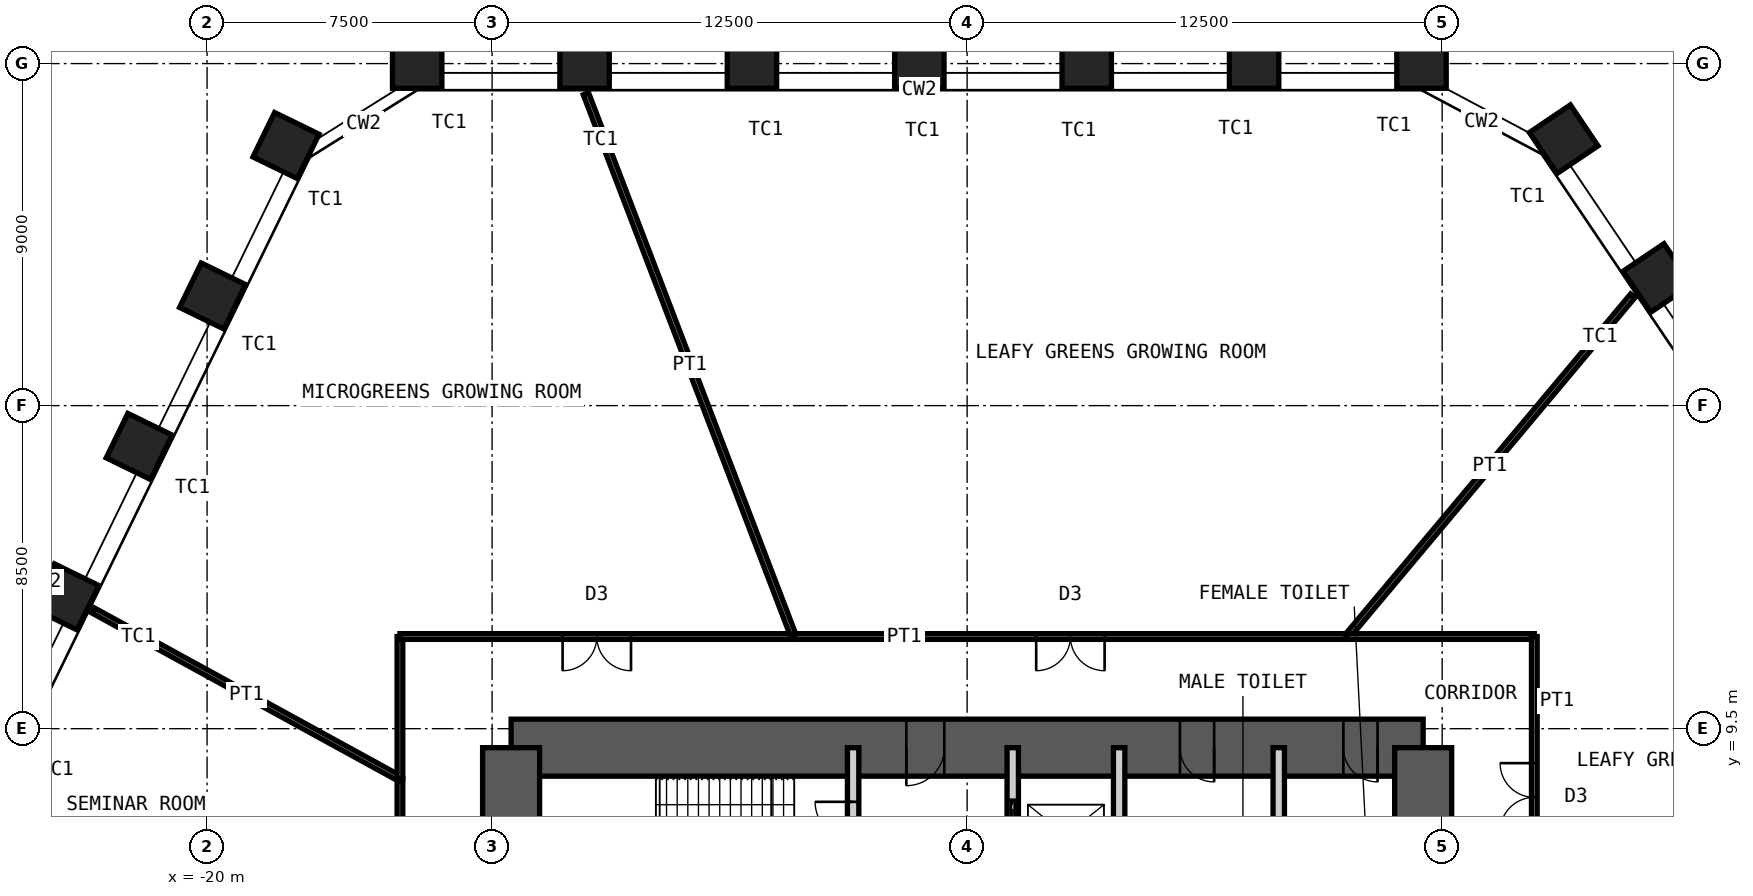
"""IFC4 building model, lengths in metres.
Left out: names, types, materials, properties, quantities, classifications, styles, units other than length and angle.
Written with IfcOpenShell. Run it as: python <this file> out.ifc"""

import sys

from ifc_helpers import new_model, si_unit, direction, frame, frame_2d, origin, origin_2d, place, context, subcontext, project, spatial, rectangle, hollow_rectangle, extrude, element, fill, save


model = new_model("IFC4")
c1 = context("Model", 3, precision=1e-05, world=origin(), true_north=direction((0.0, 1.0)))
c2 = subcontext(c1, "Body", "Model", "MODEL_VIEW")
j1 = project(units=[si_unit("LENGTHUNIT", "METRE"), si_unit("PLANEANGLEUNIT", "RADIAN")], contexts=[c1])
p1 = place(None, origin())
s1 = spatial("IfcSite", under=j1, at=p1, CompositionType="ELEMENT")
p2 = place(p1, origin())
s2 = spatial("IfcBuilding", under=s1, at=p2, CompositionType="ELEMENT")
p3 = place(p2, frame((0.0, 0.0, 22.0)))
s3 = spatial("IfcBuildingStorey", under=s2, at=p3, CompositionType="ELEMENT", Elevation=22.0)
for number, where, z_axis, x_axis in (
    (1, (-14.471, 27.0, 0.0), (0.0, 0.0, 1.0), (-1.0, 0.0, 0.0)),
    (2, (-10.067, 27.0, 0.0), (0.0, 0.0, 1.0), (-1.0, 0.0, 0.0)),
    (3, (-5.662, 27.0, 0.0), (0.0, 0.0, 1.0), (-1.0, 0.0, 0.0)),
    (4, (-1.258, 27.0, 0.0), (0.0, 0.0, 1.0), (-1.0, 0.0, 0.0)),
    (5, (3.147, 27.0, 0.0), (0.0, 0.0, 1.0), (-1.0, 0.0, 0.0)),
    (6, (7.552, 27.0, 0.0), (0.0, 0.0, 1.0), (-1.0, 0.0, 0.0)),
    (7, (11.956, 27.0, 0.0), (0.0, 0.0, 1.0), (-1.0, 0.0, 0.0)),
    (8, (15.698, 25.01, 0.0), (0.0, 0.0, 1.0), (-0.559, 0.829, 0.0)),
    (9, (18.161, 21.359, 0.0), (0.0, 0.0, 1.0), (-0.559, 0.829, 0.0)),
    (10, (-23.716, 12.966, 0.0), (0.0, 0.0, 1.0), (-0.438, -0.899, 0.0)),
    (11, (-21.785, 16.925, 0.0), (0.0, 0.0, 1.0), (-0.438, -0.899, 0.0)),
    (12, (-19.854, 20.884, 0.0), (0.0, 0.0, 1.0), (-0.438, -0.899, 0.0)),
    (13, (-17.924, 24.843, 0.0), (0.0, 0.0, 1.0), (-0.438, -0.899, 0.0)),
):
    element("IfcColumn", number, at=place(p3, frame(where, z_axis=z_axis, x_axis=x_axis)), inside=s3, PredefinedType="COLUMN", context=c2, shape_type="SweptSolid", body=[
        extrude(hollow_rectangle(XDim=1.3, YDim=1.3, WallThickness=0.1, at=origin_2d()), origin(), (0.0, 0.0, 1.0), 5.0),
    ])
p4 = place(p3, frame((-12.0, 9.0, 0.0), z_axis=(0.0, 0.0, 1.0), x_axis=(1.0, 0.0, 0.0)))
e14 = element("IfcWall", 14, at=p4, inside=s3, PredefinedType="SHEAR", context=c2, shape_type="SweptSolid", body=[
    extrude(rectangle(XDim=24.0, YDim=1.5, at=frame_2d((12.0, 0.0))), origin(), (0.0, 0.0, 1.0), 5.0),
])
p5 = place(p4, frame((10.4, 0.0, 0.0)))
e15 = element("IfcOpeningElement", 15, at=p5, cuts=e14, PredefinedType="OPENING", context=c2, shape_type="SweptSolid", body=[
    extrude(rectangle(XDim=1.0, YDim=2.1, at=frame_2d((0.5, 1.05))), frame((0.0, 0.76, 0.0), z_axis=(0.0, -1.0, 0.0), x_axis=(1.0, 0.0, 0.0)), (0.0, 0.0, 1.0), 1.52),
])
p6 = place(p4, frame((17.6, 0.0, 0.0)))
e16 = element("IfcOpeningElement", 16, at=p6, cuts=e14, PredefinedType="OPENING", context=c2, shape_type="SweptSolid", body=[
    extrude(rectangle(XDim=0.9, YDim=2.1, at=frame_2d((0.45, 1.05))), frame((0.0, 0.76, 0.0), z_axis=(0.0, -1.0, 0.0), x_axis=(1.0, 0.0, 0.0)), (0.0, 0.0, 1.0), 1.52),
])
p7 = place(p4, frame((21.9, 0.0, 0.0)))
e17 = element("IfcOpeningElement", 17, at=p7, cuts=e14, PredefinedType="OPENING", context=c2, shape_type="SweptSolid", body=[
    extrude(rectangle(XDim=0.9, YDim=2.1, at=frame_2d((0.45, 1.05))), frame((0.0, 0.76, 0.0), z_axis=(0.0, -1.0, 0.0), x_axis=(1.0, 0.0, 0.0)), (0.0, 0.0, 1.0), 1.52),
])
p8 = place(p3, frame((12.0, -9.0, 0.0), z_axis=(0.0, 0.0, 1.0), x_axis=(0.0, 1.0, 0.0)))
e18 = element("IfcWall", 18, at=p8, inside=s3, PredefinedType="SHEAR", context=c2, shape_type="SweptSolid", body=[
    extrude(rectangle(XDim=18.0, YDim=1.5, at=frame_2d((9.0, 0.0))), origin(), (0.0, 0.0, 1.0), 5.0),
])
p9 = place(p8, frame((8.1, 0.0, 0.0)))
e19 = element("IfcOpeningElement", 19, at=p9, cuts=e18, PredefinedType="OPENING", context=c2, shape_type="SweptSolid", body=[
    extrude(rectangle(XDim=1.8, YDim=2.1, at=frame_2d((0.9, 1.05))), frame((0.0, 0.76, 0.0), z_axis=(0.0, -1.0, 0.0), x_axis=(1.0, 0.0, 0.0)), (0.0, 0.0, 1.0), 1.52),
])
p10 = place(p3, frame((-12.0, -9.0, 0.0), z_axis=(0.0, 0.0, 1.0), x_axis=(0.0, 1.0, 0.0)))
e20 = element("IfcWall", 20, at=p10, inside=s3, PredefinedType="SHEAR", context=c2, shape_type="SweptSolid", body=[
    extrude(rectangle(XDim=18.0, YDim=1.5, at=frame_2d((9.0, 0.0))), origin(), (0.0, 0.0, 1.0), 5.0),
])
p11 = place(p10, frame((8.1, 0.0, 0.0)))
e21 = element("IfcOpeningElement", 21, at=p11, cuts=e20, PredefinedType="OPENING", context=c2, shape_type="SweptSolid", body=[
    extrude(rectangle(XDim=1.8, YDim=2.1, at=frame_2d((0.9, 1.05))), frame((0.0, 0.76, 0.0), z_axis=(0.0, -1.0, 0.0), x_axis=(1.0, 0.0, 0.0)), (0.0, 0.0, 1.0), 1.52),
])
p12 = place(p3, frame((-3.0, 5.15, 0.0), z_axis=(0.0, 0.0, 1.0), x_axis=(0.0, 1.0, 0.0)))
e22 = element("IfcWall", 22, at=p12, inside=s3, PredefinedType="PARTITIONING", context=c2, shape_type="SweptSolid", body=[
    extrude(rectangle(XDim=3.85, YDim=0.3, at=frame_2d((1.925, 0.0))), origin(), (0.0, 0.0, 1.0), 4.78),
])
p13 = place(p12, frame((1.425, 0.0, 0.0)))
e23 = element("IfcOpeningElement", 23, at=p13, cuts=e22, PredefinedType="OPENING", context=c2, shape_type="SweptSolid", body=[
    extrude(rectangle(XDim=1.0, YDim=2.1, at=frame_2d((0.5, 1.05))), frame((0.0, 0.16, 0.0), z_axis=(0.0, -1.0, 0.0), x_axis=(1.0, 0.0, 0.0)), (0.0, 0.0, 1.0), 0.32),
])
p14 = place(p3, frame((1.2, 5.15, 0.0), z_axis=(0.0, 0.0, 1.0), x_axis=(0.0, 1.0, 0.0)))
e24 = element("IfcWall", 24, at=p14, inside=s3, PredefinedType="PARTITIONING", context=c2, shape_type="SweptSolid", body=[
    extrude(rectangle(XDim=3.85, YDim=0.3, at=frame_2d((1.925, 0.0))), origin(), (0.0, 0.0, 1.0), 4.78),
])
p15 = place(p14, frame((1.375, 0.0, 0.0)))
e25 = element("IfcOpeningElement", 25, at=p15, cuts=e24, PredefinedType="OPENING", context=c2, shape_type="SweptSolid", body=[
    extrude(rectangle(XDim=1.1, YDim=2.4, at=frame_2d((0.55, 1.2))), frame((0.0, 0.16, 0.0), z_axis=(0.0, -1.0, 0.0), x_axis=(1.0, 0.0, 0.0)), (0.0, 0.0, 1.0), 0.32),
])
for number, where, z_axis, x_axis in (
    (26, (4.0, 5.15, 0.0), (0.0, 0.0, 1.0), (0.0, 1.0, 0.0)),
    (27, (8.2, 5.15, 0.0), (0.0, 0.0, 1.0), (0.0, 1.0, 0.0)),
):
    element("IfcWall", number, at=place(p3, frame(where, z_axis=z_axis, x_axis=x_axis)), inside=s3, PredefinedType="PARTITIONING", context=c2, shape_type="SweptSolid", body=[
        extrude(rectangle(XDim=3.85, YDim=0.3, at=frame_2d((1.925, 0.0))), origin(), (0.0, 0.0, 1.0), 4.78),
    ])
p16 = place(p3, frame((-14.925, 2.626, 0.0), z_axis=(0.0, 0.0, 1.0), x_axis=(0.0, 1.0, 0.0)))
e28 = element("IfcWall", 28, at=p16, inside=s3, PredefinedType="PARTITIONING", context=c2, shape_type="SweptSolid", body=[
    extrude(rectangle(XDim=5.558, YDim=0.15, at=frame_2d((2.779, 0.0))), origin(), (0.0, 0.0, 1.0), 4.8),
])
p17 = place(p16, frame((2.279, 0.0, 0.0)))
e29 = element("IfcOpeningElement", 29, at=p17, cuts=e28, PredefinedType="OPENING", context=c2, shape_type="SweptSolid", body=[
    extrude(rectangle(XDim=1.0, YDim=2.4, at=frame_2d((0.5, 1.2))), frame((0.0, 0.085, 0.0), z_axis=(0.0, -1.0, 0.0), x_axis=(1.0, 0.0, 0.0)), (0.0, 0.0, 1.0), 0.17),
])
p18 = place(p3, frame((-22.999, 12.612, 0.0), z_axis=(0.0, 0.0, 1.0), x_axis=(0.876826470608, -0.480806967963, 0.0)))
e30 = element("IfcWall", 30, at=p18, inside=s3, PredefinedType="PARTITIONING", context=c2, shape_type="SweptSolid", body=[
    extrude(rectangle(XDim=9.208, YDim=0.15, at=frame_2d((4.604, 0.0))), origin(), (0.0, 0.0, 1.0), 3.7),
])
p19 = place(p3, frame((-14.925, 8.184, 0.0), z_axis=(0.0, 0.0, 1.0), x_axis=(0.0, 1.0, 0.0)))
e31 = element("IfcWall", 31, at=p19, inside=s3, PredefinedType="PARTITIONING", context=c2, shape_type="SweptSolid", body=[
    extrude(rectangle(XDim=3.741, YDim=0.15, at=frame_2d((1.871, 0.0))), origin(), (0.0, 0.0, 1.0), 4.8),
])
p20 = place(p3, frame((-14.925, 11.925, 0.0), z_axis=(0.0, 0.0, 1.0), x_axis=(1.0, 0.0, 0.0)))
e32 = element("IfcWall", 32, at=p20, inside=s3, PredefinedType="PARTITIONING", context=c2, shape_type="SweptSolid", body=[
    extrude(rectangle(XDim=10.361, YDim=0.15, at=frame_2d((5.18, 0.0))), origin(), (0.0, 0.0, 1.0), 4.8),
])
p21 = place(p20, frame((4.28, 0.0, 0.0)))
e33 = element("IfcOpeningElement", 33, at=p21, cuts=e32, PredefinedType="OPENING", context=c2, shape_type="SweptSolid", body=[
    extrude(rectangle(XDim=1.8, YDim=2.4, at=frame_2d((0.9, 1.2))), frame((0.0, 0.085, 0.0), z_axis=(0.0, -1.0, 0.0), x_axis=(1.0, 0.0, 0.0)), (0.0, 0.0, 1.0), 0.17),
])
p22 = place(p3, frame((-10.031, 26.207, 0.0), z_axis=(0.0, 0.0, 1.0), x_axis=(0.357478701909, -0.933921290946, 0.0)))
e34 = element("IfcWall", 34, at=p22, inside=s3, PredefinedType="PARTITIONING", context=c2, shape_type="SweptSolid", body=[
    extrude(rectangle(XDim=15.292, YDim=0.15, at=frame_2d((7.646, 0.0))), origin(), (0.0, 0.0, 1.0), 3.7),
])
p23 = place(p3, frame((-4.564, 11.925, 0.0), z_axis=(0.0, 0.0, 1.0), x_axis=(1.0, 0.0, 0.0)))
e35 = element("IfcWall", 35, at=p23, inside=s3, PredefinedType="PARTITIONING", context=c2, shape_type="SweptSolid", body=[
    extrude(rectangle(XDim=14.563, YDim=0.15, at=frame_2d((7.282, 0.0))), origin(), (0.0, 0.0, 1.0), 4.8),
])
p24 = place(p23, frame((6.382, 0.0, 0.0)))
e36 = element("IfcOpeningElement", 36, at=p24, cuts=e35, PredefinedType="OPENING", context=c2, shape_type="SweptSolid", body=[
    extrude(rectangle(XDim=1.8, YDim=2.4, at=frame_2d((0.9, 1.2))), frame((0.0, 0.085, 0.0), z_axis=(0.0, -1.0, 0.0), x_axis=(1.0, 0.0, 0.0)), (0.0, 0.0, 1.0), 0.17),
])
p25 = place(p3, frame((17.517, 20.891, 0.0), z_axis=(0.0, 0.0, 1.0), x_axis=(-0.642515050703, -0.766273064658, 0.0)))
e37 = element("IfcWall", 37, at=p25, inside=s3, PredefinedType="PARTITIONING", context=c2, shape_type="SweptSolid", body=[
    extrude(rectangle(XDim=11.7, YDim=0.15, at=frame_2d((5.85, 0.0))), origin(), (0.0, 0.0, 1.0), 3.7),
])
p26 = place(p3, frame((9.999, 11.925, 0.0), z_axis=(0.0, 0.0, 1.0), x_axis=(1.0, 0.0, 0.0)))
e38 = element("IfcWall", 38, at=p26, inside=s3, PredefinedType="PARTITIONING", context=c2, shape_type="SweptSolid", body=[
    extrude(rectangle(XDim=4.926, YDim=0.15, at=frame_2d((2.463, 0.0))), origin(), (0.0, 0.0, 1.0), 4.8),
])
p27 = place(p3, frame((14.925, 11.925, 0.0), z_axis=(0.0, 0.0, 1.0), x_axis=(0.0, -1.0, 0.0)))
e39 = element("IfcWall", 39, at=p27, inside=s3, PredefinedType="PARTITIONING", context=c2, shape_type="SweptSolid", body=[
    extrude(rectangle(XDim=8.464, YDim=0.15, at=frame_2d((4.232, 0.0))), origin(), (0.0, 0.0, 1.0), 4.8),
])
p28 = place(p27, frame((3.332, 0.0, 0.0)))
e40 = element("IfcOpeningElement", 40, at=p28, cuts=e39, PredefinedType="OPENING", context=c2, shape_type="SweptSolid", body=[
    extrude(rectangle(XDim=1.8, YDim=2.4, at=frame_2d((0.9, 1.2))), frame((0.0, 0.085, 0.0), z_axis=(0.0, -1.0, 0.0), x_axis=(1.0, 0.0, 0.0)), (0.0, 0.0, 1.0), 0.17),
])
p29 = place(p5, origin())
e41 = element("IfcDoor", 41, at=p29, inside=s3, OperationType="SINGLE_SWING_LEFT", PredefinedType="DOOR", context=c2, shape_type="SweptSolid", body=[
    extrude(rectangle(XDim=1.0, YDim=2.1, at=frame_2d((0.5, 1.05))), frame((0.0, 0.025, 0.0), z_axis=(0.0, -1.0, 0.0), x_axis=(1.0, 0.0, 0.0)), (0.0, 0.0, 1.0), 0.05),
])
fill(e15, e41)
p30 = place(p6, origin())
e42 = element("IfcDoor", 42, at=p30, inside=s3, OperationType="SINGLE_SWING_RIGHT", PredefinedType="DOOR", context=c2, shape_type="SweptSolid", body=[
    extrude(rectangle(XDim=0.9, YDim=2.1, at=frame_2d((0.45, 1.05))), frame((0.0, 0.025, 0.0), z_axis=(0.0, -1.0, 0.0), x_axis=(1.0, 0.0, 0.0)), (0.0, 0.0, 1.0), 0.05),
])
fill(e16, e42)
p31 = place(p7, origin())
e43 = element("IfcDoor", 43, at=p31, inside=s3, OperationType="SINGLE_SWING_RIGHT", PredefinedType="DOOR", context=c2, shape_type="SweptSolid", body=[
    extrude(rectangle(XDim=0.9, YDim=2.1, at=frame_2d((0.45, 1.05))), frame((0.0, 0.025, 0.0), z_axis=(0.0, -1.0, 0.0), x_axis=(1.0, 0.0, 0.0)), (0.0, 0.0, 1.0), 0.05),
])
fill(e17, e43)
p32 = place(p13, origin())
e44 = element("IfcDoor", 44, at=p32, inside=s3, OperationType="SINGLE_SWING_LEFT", PredefinedType="DOOR", context=c2, shape_type="SweptSolid", body=[
    extrude(rectangle(XDim=1.0, YDim=2.1, at=frame_2d((0.5, 1.05))), frame((0.0, 0.025, 0.0), z_axis=(0.0, -1.0, 0.0), x_axis=(1.0, 0.0, 0.0)), (0.0, 0.0, 1.0), 0.05),
])
fill(e23, e44)
p33 = place(p15, origin())
e45 = element("IfcDoor", 45, at=p33, inside=s3, OperationType="DOUBLE_DOOR_SLIDING", PredefinedType="DOOR", context=c2, shape_type="SweptSolid", body=[
    extrude(rectangle(XDim=1.1, YDim=2.4, at=frame_2d((0.55, 1.2))), frame((0.0, 0.025, 0.0), z_axis=(0.0, -1.0, 0.0), x_axis=(1.0, 0.0, 0.0)), (0.0, 0.0, 1.0), 0.05),
])
fill(e25, e45)
p34 = place(p21, origin())
e46 = element("IfcDoor", 46, at=p34, inside=s3, OperationType="DOUBLE_DOOR_DOUBLE_SWING", PredefinedType="DOOR", context=c2, shape_type="SweptSolid", body=[
    extrude(rectangle(XDim=1.8, YDim=2.4, at=frame_2d((0.9, 1.2))), frame((0.0, 0.025, 0.0), z_axis=(0.0, -1.0, 0.0), x_axis=(1.0, 0.0, 0.0)), (0.0, 0.0, 1.0), 0.05),
])
fill(e33, e46)
p35 = place(p24, origin())
e47 = element("IfcDoor", 47, at=p35, inside=s3, OperationType="DOUBLE_DOOR_DOUBLE_SWING", PredefinedType="DOOR", context=c2, shape_type="SweptSolid", body=[
    extrude(rectangle(XDim=1.8, YDim=2.4, at=frame_2d((0.9, 1.2))), frame((0.0, 0.025, 0.0), z_axis=(0.0, -1.0, 0.0), x_axis=(1.0, 0.0, 0.0)), (0.0, 0.0, 1.0), 0.05),
])
fill(e36, e47)
p36 = place(p28, origin())
e48 = element("IfcDoor", 48, at=p36, inside=s3, OperationType="DOUBLE_DOOR_DOUBLE_SWING", PredefinedType="DOOR", context=c2, shape_type="SweptSolid", body=[
    extrude(rectangle(XDim=1.8, YDim=2.4, at=frame_2d((0.9, 1.2))), frame((0.0, 0.025, 0.0), z_axis=(0.0, -1.0, 0.0), x_axis=(1.0, 0.0, 0.0)), (0.0, 0.0, 1.0), 0.05),
])
fill(e40, e48)
save(model, sys.argv[1])
